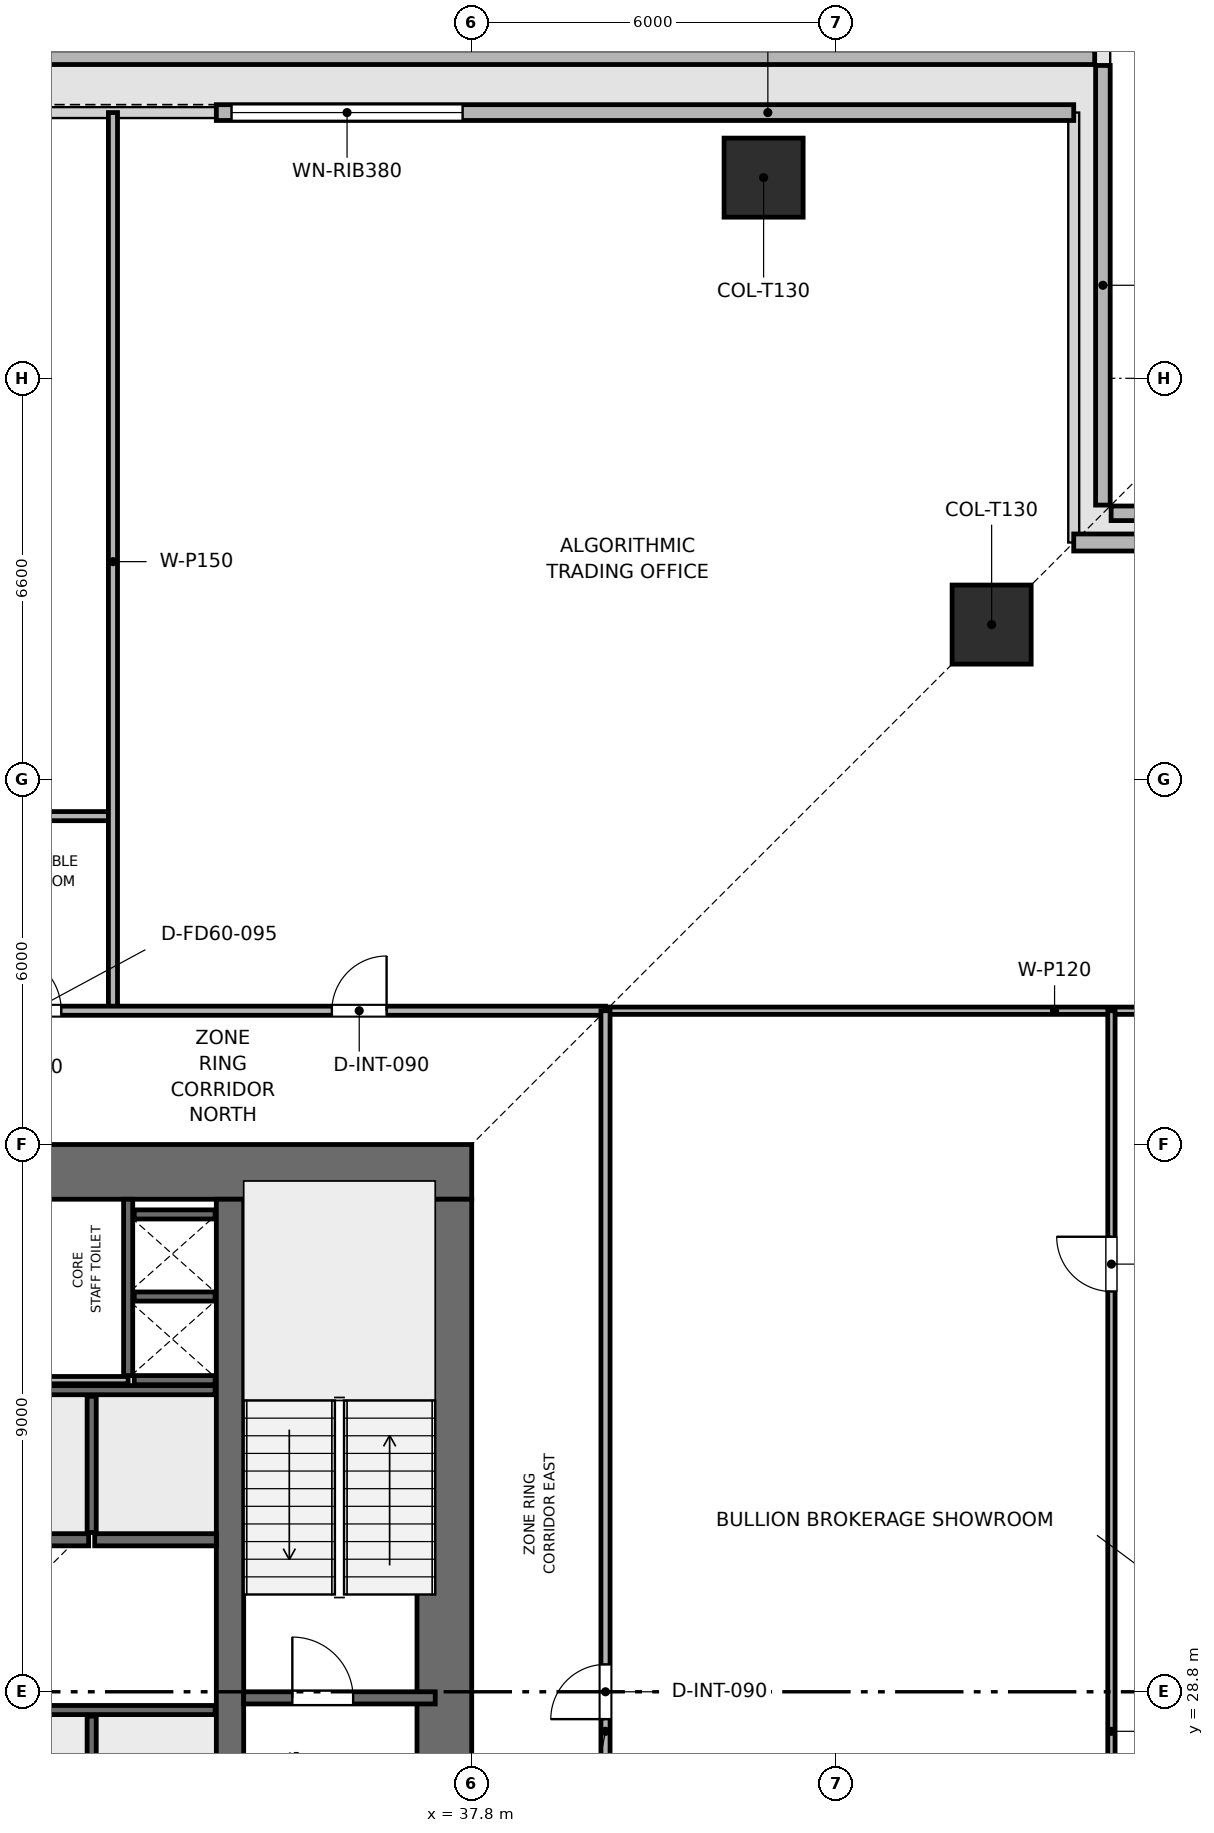
"""IFC4 building model, lengths in metres.
Left out: names, types, materials, properties, quantities, classifications, styles, units other than length and angle.
Written with IfcOpenShell. Run it as: python <this file> out.ifc"""

import sys

from ifc_helpers import new_model, si_unit, direction, frame, frame_2d, origin, origin_2d, place, context, subcontext, project, spatial, rectangle, extrude, element, fill, save


model = new_model("IFC4")
c1 = context("Model", 3, precision=1e-05, world=origin(), true_north=direction((0.0, 1.0)))
c2 = subcontext(c1, "Body", "Model", "MODEL_VIEW")
j1 = project(units=[si_unit("LENGTHUNIT", "METRE"), si_unit("PLANEANGLEUNIT", "RADIAN")], contexts=[c1])
p1 = place(None, origin())
s1 = spatial("IfcSite", under=j1, at=p1, CompositionType="ELEMENT")
p2 = place(p1, origin())
s2 = spatial("IfcBuilding", under=s1, at=p2, CompositionType="ELEMENT")
p3 = place(p2, frame((0.0, 0.0, 113.4)))
s3 = spatial("IfcBuildingStorey", under=s2, at=p3, CompositionType="ELEMENT", Elevation=113.4)
p4 = place(p3, frame((19.8, 37.35, 0.0), z_axis=(0.0, 0.0, 1.0), x_axis=(1.0, 0.0, 0.0)))
e1 = element("IfcWall", 1, at=p4, inside=s3, PredefinedType="SHEAR", context=c2, shape_type="SweptSolid", body=[
    extrude(rectangle(XDim=18.0, YDim=0.9, at=frame_2d((9.0, 0.0))), origin(), (0.0, 0.0, 1.0), 3.9),
])
p5 = place(p4, frame((7.05, 0.0, 0.0)))
e2 = element("IfcOpeningElement", 2, at=p5, cuts=e1, PredefinedType="OPENING", context=c2, shape_type="SweptSolid", body=[
    extrude(rectangle(XDim=1.1, YDim=2.15, at=frame_2d((0.55, 1.075))), frame((0.0, 0.46, 0.0), z_axis=(0.0, -1.0, 0.0), x_axis=(1.0, 0.0, 0.0)), (0.0, 0.0, 1.0), 0.92),
])
p6 = place(p3, frame((37.35, 20.7, 0.0), z_axis=(0.0, 0.0, 1.0), x_axis=(0.0, 1.0, 0.0)))
e3 = element("IfcWall", 3, at=p6, inside=s3, PredefinedType="SHEAR", context=c2, shape_type="SweptSolid", body=[
    extrude(rectangle(XDim=16.2, YDim=0.9, at=frame_2d((8.1, 0.0))), origin(), (0.0, 0.0, 1.0), 3.9),
])
p7 = place(p6, frame((4.6, 0.0, 0.0)))
e4 = element("IfcOpeningElement", 4, at=p7, cuts=e3, PredefinedType="OPENING", context=c2, shape_type="SweptSolid", body=[
    extrude(rectangle(XDim=1.1, YDim=2.15, at=frame_2d((0.55, 1.075))), frame((0.0, 0.46, 0.0), z_axis=(0.0, -1.0, 0.0), x_axis=(1.0, 0.0, 0.0)), (0.0, 0.0, 1.0), 0.92),
])
p8 = place(p3, frame((33.825, 20.7, 0.0), z_axis=(0.0, 0.0, 1.0), x_axis=(0.0, 1.0, 0.0)))
e5 = element("IfcWall", 5, at=p8, inside=s3, PredefinedType="SHEAR", context=c2, shape_type="SweptSolid", body=[
    extrude(rectangle(XDim=16.2, YDim=0.45, at=frame_2d((8.1, 0.0))), origin(), (0.0, 0.0, 1.0), 3.9),
])
for number, where, z_axis, x_axis in (
    (6, (42.6, 53.7, 0.003), (0.0, 0.0, 1.0), (1.0, 0.0, 0.0)),
    (7, (46.35, 46.35, 0.003), (0.0, 0.0, 1.0), (1.0, 0.0, 0.0)),
):
    element("IfcColumn", number, at=place(p3, frame(where, z_axis=z_axis, x_axis=x_axis)), inside=s3, PredefinedType="COLUMN", context=c2, shape_type="SweptSolid", body=[
        extrude(rectangle(XDim=1.3, YDim=1.3, at=origin_2d()), origin(), (0.0, 0.0, 1.0), 3.644),
    ])
for number, where, z_axis, x_axis in (
    (8, (55.545, 48.18, 0.0), (0.0, 0.0, 1.0), (-1.0, 0.0, 0.0)),
    (9, (48.18, 48.315, 0.0), (0.0, 0.0, 1.0), (0.0, 1.0, 0.0)),
):
    element("IfcWall", number, at=place(p3, frame(where, z_axis=z_axis, x_axis=x_axis)), inside=s3, PredefinedType="PARAPET", context=c2, shape_type="SweptSolid", body=[
        extrude(rectangle(XDim=7.23, YDim=0.24, at=frame_2d((3.615, 0.0))), origin(), (0.0, 0.0, 1.0), 1.2),
    ])
p9 = place(p3, frame((48.045, 55.68, 0.0), z_axis=(0.0, 0.0, 1.0), x_axis=(-1.0, 0.0, 0.0)))
e10 = element("IfcWall", 10, at=p9, inside=s3, PredefinedType="PARAPET", context=c2, shape_type="SweptSolid", body=[
    extrude(rectangle(XDim=38.49, YDim=0.24, at=frame_2d((19.245, 0.0))), origin(), (0.0, 0.0, 1.0), 1.2),
])
p10 = place(p3, frame((33.6, 54.77, 0.0), z_axis=(0.0, 0.0, 1.0), x_axis=(1.0, 0.0, 0.0)))
e11 = element("IfcWall", 11, at=p10, inside=s3, PredefinedType="SOLIDWALL", context=c2, shape_type="SweptSolid", body=[
    extrude(rectangle(XDim=14.1, YDim=0.26, at=frame_2d((7.05, 0.0))), origin(), (0.0, 0.0, 1.0), 3.65),
])
p11 = place(p10, frame((0.25, 0.0, 0.9)))
e12 = element("IfcOpeningElement", 12, at=p11, cuts=e11, PredefinedType="OPENING", context=c2, shape_type="SweptSolid", body=[
    extrude(rectangle(XDim=3.8, YDim=1.9, at=frame_2d((1.9, 0.95))), frame((0.0, 0.14, 0.0), z_axis=(0.0, -1.0, 0.0), x_axis=(1.0, 0.0, 0.0)), (0.0, 0.0, 1.0), 0.28),
])
p12 = place(p3, frame((47.7, 47.7, 0.0), z_axis=(0.0, 0.0, 1.0), x_axis=(1.0, 0.0, 0.0)))
e13 = element("IfcWall", 13, at=p12, inside=s3, PredefinedType="SOLIDWALL", context=c2, shape_type="SweptSolid", body=[
    extrude(rectangle(XDim=7.07, YDim=0.28, at=frame_2d((3.535, 0.0))), origin(), (0.0, 0.0, 1.0), 3.65),
])
p13 = place(p12, frame((2.285, 0.0, 0.9)))
e14 = element("IfcOpeningElement", 14, at=p13, cuts=e13, PredefinedType="OPENING", context=c2, shape_type="SweptSolid", body=[
    extrude(rectangle(XDim=2.5, YDim=1.9, at=frame_2d((1.25, 0.95))), frame((0.0, 0.15, 0.0), z_axis=(0.0, -1.0, 0.0), x_axis=(1.0, 0.0, 0.0)), (0.0, 0.0, 1.0), 0.3),
])
p14 = place(p3, frame((34.05, 28.7, 0.0), z_axis=(0.0, 0.0, 1.0), x_axis=(1.0, 0.0, 0.0)))
e15 = element("IfcWall", 15, at=p14, inside=s3, PredefinedType="SHEAR", context=c2, shape_type="SweptSolid", body=[
    extrude(rectangle(XDim=3.15, YDim=0.2, at=frame_2d((1.575, 0.0))), origin(), (0.0, 0.0, 1.0), 3.65),
])
p15 = place(p14, frame((0.8, 0.0, 0.0)))
e16 = element("IfcOpeningElement", 16, at=p15, cuts=e15, PredefinedType="OPENING", context=c2, shape_type="SweptSolid", body=[
    extrude(rectangle(XDim=1.0, YDim=2.1, at=frame_2d((0.5, 1.05))), frame((0.0, 0.11, 0.0), z_axis=(0.0, -1.0, 0.0), x_axis=(1.0, 0.0, 0.0)), (0.0, 0.0, 1.0), 0.22),
])
p16 = place(p3, frame((32.15, 34.0, 0.0), z_axis=(0.0, 0.0, 1.0), x_axis=(0.0, 1.0, 0.0)))
e17 = element("IfcWall", 17, at=p16, inside=s3, PredefinedType="SHEAR", context=c2, shape_type="SweptSolid", body=[
    extrude(rectangle(XDim=2.9, YDim=0.15, at=frame_2d((1.45, 0.0))), origin(), (0.0, 0.0, 1.0), 3.65),
])
for number, where, z_axis, x_axis in (
    (18, (32.25, 33.925, 0.0), (0.0, 0.0, 1.0), (1.0, 0.0, 0.0)),
    (19, (32.25, 35.3, 0.0), (0.0, 0.0, 1.0), (1.0, 0.0, 0.0)),
):
    element("IfcWall", number, at=place(p3, frame(where, z_axis=z_axis, x_axis=x_axis)), inside=s3, PredefinedType="SHEAR", context=c2, shape_type="SweptSolid", body=[
        extrude(rectangle(XDim=1.33, YDim=0.15, at=frame_2d((0.665, 0.0))), origin(), (0.0, 0.0, 1.0), 3.65),
    ])
for number, where, z_axis, x_axis in (
    (20, (29.5, 31.3, 0.0), (0.0, 0.0, 1.0), (1.0, 0.0, 0.0)),
    (21, (31.6, 31.3, 0.0), (0.0, 0.0, 1.0), (1.0, 0.0, 0.0)),
):
    element("IfcWall", number, at=place(p3, frame(where, z_axis=z_axis, x_axis=x_axis)), inside=s3, PredefinedType="SHEAR", context=c2, shape_type="SweptSolid", body=[
        extrude(rectangle(XDim=2.0, YDim=0.2, at=frame_2d((1.0, 0.0))), origin(), (0.0, 0.0, 1.0), 3.65),
    ])
p17 = place(p3, frame((32.25, 36.65, 0.0), z_axis=(0.0, 0.0, 1.0), x_axis=(1.0, 0.0, 0.0)))
e22 = element("IfcWall", 22, at=p17, inside=s3, PredefinedType="SHEAR", context=c2, shape_type="SweptSolid", body=[
    extrude(rectangle(XDim=1.33, YDim=0.15, at=frame_2d((0.665, 0.0))), origin(), (0.0, 0.0, 1.0), 3.65),
])
p18 = place(p3, frame((29.5, 28.5, 0.0), z_axis=(0.0, 0.0, 1.0), x_axis=(1.0, 0.0, 0.0)))
e23 = element("IfcWall", 23, at=p18, inside=s3, PredefinedType="SHEAR", context=c2, shape_type="SweptSolid", body=[
    extrude(rectangle(XDim=4.08, YDim=0.15, at=frame_2d((2.04, 0.0))), origin(), (0.0, 0.0, 1.0), 3.65),
])
p19 = place(p3, frame((31.55, 26.12, 0.0), z_axis=(0.0, 0.0, 1.0), x_axis=(0.0, 1.0, 0.0)))
e24 = element("IfcWall", 24, at=p19, inside=s3, PredefinedType="SHEAR", context=c2, shape_type="SweptSolid", body=[
    extrude(rectangle(XDim=2.28, YDim=0.15, at=frame_2d((1.14, 0.0))), origin(), (0.0, 0.0, 1.0), 3.65),
])
p20 = place(p3, frame((29.5, 33.76, 0.0), z_axis=(0.0, 0.0, 1.0), x_axis=(1.0, 0.0, 0.0)))
e25 = element("IfcWall", 25, at=p20, inside=s3, PredefinedType="SHEAR", context=c2, shape_type="SweptSolid", body=[
    extrude(rectangle(XDim=4.08, YDim=0.15, at=frame_2d((2.04, 0.0))), origin(), (0.0, 0.0, 1.0), 3.65),
])
p21 = place(p3, frame((31.55, 31.42, 0.0), z_axis=(0.0, 0.0, 1.0), x_axis=(0.0, 1.0, 0.0)))
e26 = element("IfcWall", 26, at=p21, inside=s3, PredefinedType="SHEAR", context=c2, shape_type="SweptSolid", body=[
    extrude(rectangle(XDim=2.24, YDim=0.15, at=frame_2d((1.12, 0.0))), origin(), (0.0, 0.0, 1.0), 3.65),
])
p22 = place(p3, frame((30.5, 33.925, 0.0), z_axis=(0.0, 0.0, 1.0), x_axis=(1.0, 0.0, 0.0)))
e27 = element("IfcWall", 27, at=p22, inside=s3, PredefinedType="PARTITIONING", context=c2, shape_type="SweptSolid", body=[
    extrude(rectangle(XDim=1.65, YDim=0.12, at=frame_2d((0.825, 0.0))), origin(), (0.0, 0.0, 1.0), 3.65),
])
p23 = place(p3, frame((23.5, 43.2, 0.0), z_axis=(0.0, 0.0, 1.0), x_axis=(1.0, 0.0, 0.0)))
e28 = element("IfcWall", 28, at=p23, inside=s3, PredefinedType="PARTITIONING", context=c2, shape_type="SweptSolid", body=[
    extrude(rectangle(XDim=8.4, YDim=0.15, at=frame_2d((4.2, 0.0))), origin(), (0.0, 0.0, 1.0), 3.185),
])
p24 = place(p3, frame((31.9, 40.0, 0.0), z_axis=(0.0, 0.0, 1.0), x_axis=(0.0, 1.0, 0.0)))
e29 = element("IfcWall", 29, at=p24, inside=s3, PredefinedType="PARTITIONING", context=c2, shape_type="SweptSolid", body=[
    extrude(rectangle(XDim=14.77, YDim=0.15, at=frame_2d((7.385, 0.0))), origin(), (0.0, 0.0, 1.0), 3.035),
])
p25 = place(p3, frame((40.0, 40.0, 0.0), z_axis=(0.0, 0.0, 1.0), x_axis=(1.0, 0.0, 0.0)))
e30 = element("IfcWall", 30, at=p25, inside=s3, PredefinedType="PARTITIONING", context=c2, shape_type="SweptSolid", body=[
    extrude(rectangle(XDim=14.77, YDim=0.12, at=frame_2d((7.385, 0.0))), origin(), (0.0, 0.0, 1.0), 3.035),
])
p26 = place(p3, frame((48.32, 17.6, 0.0), z_axis=(0.0, 0.0, 1.0), x_axis=(0.0, 1.0, 0.0)))
e31 = element("IfcWall", 31, at=p26, inside=s3, PredefinedType="PARTITIONING", context=c2, shape_type="SweptSolid", body=[
    extrude(rectangle(XDim=22.4, YDim=0.12, at=frame_2d((11.2, 0.0))), origin(), (0.0, 0.0, 1.0), 3.185),
])
p27 = place(p26, frame((17.783, 0.0, 0.0)))
e32 = element("IfcOpeningElement", 32, at=p27, cuts=e31, PredefinedType="OPENING", context=c2, shape_type="SweptSolid", body=[
    extrude(rectangle(XDim=0.9, YDim=2.1, at=frame_2d((0.45, 1.05))), frame((0.0, 0.07, 0.0), z_axis=(0.0, -1.0, 0.0), x_axis=(1.0, 0.0, 0.0)), (0.0, 0.0, 1.0), 0.14),
])
p28 = place(p3, frame((17.6, 40.0, 0.0), z_axis=(0.0, 0.0, 1.0), x_axis=(1.0, 0.0, 0.0)))
e33 = element("IfcWall", 33, at=p28, inside=s3, PredefinedType="PARTITIONING", context=c2, shape_type="SweptSolid", body=[
    extrude(rectangle(XDim=22.4, YDim=0.15, at=frame_2d((11.2, 0.0))), origin(), (0.0, 0.0, 1.0), 3.185),
])
p29 = place(p28, frame((2.5, 0.0, 0.0)))
e34 = element("IfcOpeningElement", 34, at=p29, cuts=e33, PredefinedType="OPENING", context=c2, shape_type="SweptSolid", body=[
    extrude(rectangle(XDim=0.9, YDim=2.1, at=frame_2d((0.45, 1.05))), frame((0.0, 0.085, 0.0), z_axis=(0.0, -1.0, 0.0), x_axis=(1.0, 0.0, 0.0)), (0.0, 0.0, 1.0), 0.17),
])
p30 = place(p28, frame((6.85, 0.0, 0.0)))
e35 = element("IfcOpeningElement", 35, at=p30, cuts=e33, PredefinedType="OPENING", context=c2, shape_type="SweptSolid", body=[
    extrude(rectangle(XDim=0.9, YDim=2.1, at=frame_2d((0.45, 1.05))), frame((0.0, 0.085, 0.0), z_axis=(0.0, -1.0, 0.0), x_axis=(1.0, 0.0, 0.0)), (0.0, 0.0, 1.0), 0.17),
])
p31 = place(p28, frame((9.75, 0.0, 0.0)))
e36 = element("IfcOpeningElement", 36, at=p31, cuts=e33, PredefinedType="OPENING", context=c2, shape_type="SweptSolid", body=[
    extrude(rectangle(XDim=0.9, YDim=2.1, at=frame_2d((0.45, 1.05))), frame((0.0, 0.085, 0.0), z_axis=(0.0, -1.0, 0.0), x_axis=(1.0, 0.0, 0.0)), (0.0, 0.0, 1.0), 0.17),
])
p32 = place(p28, frame((12.5, 0.0, 0.0)))
e37 = element("IfcOpeningElement", 37, at=p32, cuts=e33, PredefinedType="OPENING", context=c2, shape_type="SweptSolid", body=[
    extrude(rectangle(XDim=0.95, YDim=2.1, at=frame_2d((0.475, 1.05))), frame((0.0, 0.085, 0.0), z_axis=(0.0, -1.0, 0.0), x_axis=(1.0, 0.0, 0.0)), (0.0, 0.0, 1.0), 0.17),
])
p33 = place(p28, frame((17.9, 0.0, 0.0)))
e38 = element("IfcOpeningElement", 38, at=p33, cuts=e33, PredefinedType="OPENING", context=c2, shape_type="SweptSolid", body=[
    extrude(rectangle(XDim=0.9, YDim=2.1, at=frame_2d((0.45, 1.05))), frame((0.0, 0.085, 0.0), z_axis=(0.0, -1.0, 0.0), x_axis=(1.0, 0.0, 0.0)), (0.0, 0.0, 1.0), 0.17),
])
p34 = place(p3, frame((40.0, 17.6, 0.0), z_axis=(0.0, 0.0, 1.0), x_axis=(0.0, 1.0, 0.0)))
e39 = element("IfcWall", 39, at=p34, inside=s3, PredefinedType="PARTITIONING", context=c2, shape_type="SweptSolid", body=[
    extrude(rectangle(XDim=22.4, YDim=0.15, at=frame_2d((11.2, 0.0))), origin(), (0.0, 0.0, 1.0), 3.185),
])
p35 = place(p34, frame((10.75, 0.0, 0.0)))
e40 = element("IfcOpeningElement", 40, at=p35, cuts=e39, PredefinedType="OPENING", context=c2, shape_type="SweptSolid", body=[
    extrude(rectangle(XDim=0.9, YDim=2.1, at=frame_2d((0.45, 1.05))), frame((0.0, 0.085, 0.0), z_axis=(0.0, -1.0, 0.0), x_axis=(1.0, 0.0, 0.0)), (0.0, 0.0, 1.0), 0.17),
])
p36 = place(p11, origin())
e41 = element("IfcWindow", 41, at=p36, inside=s3, PartitioningType="SINGLE_PANEL", PredefinedType="WINDOW", context=c2, shape_type="SweptSolid", body=[
    extrude(rectangle(XDim=3.8, YDim=1.9, at=frame_2d((1.9, 0.95))), frame((0.0, 0.03, 0.0), z_axis=(0.0, -1.0, 0.0), x_axis=(1.0, 0.0, 0.0)), (0.0, 0.0, 1.0), 0.06),
])
fill(e12, e41)
p37 = place(p15, origin())
e42 = element("IfcDoor", 42, at=p37, inside=s3, OperationType="SINGLE_SWING_LEFT", PredefinedType="DOOR", context=c2, shape_type="SweptSolid", body=[
    extrude(rectangle(XDim=1.0, YDim=2.1, at=frame_2d((0.5, 1.05))), frame((0.0, 0.025, 0.0), z_axis=(0.0, -1.0, 0.0), x_axis=(1.0, 0.0, 0.0)), (0.0, 0.0, 1.0), 0.05),
])
fill(e16, e42)
p38 = place(p27, origin())
e43 = element("IfcDoor", 43, at=p38, inside=s3, OperationType="SINGLE_SWING_RIGHT", PredefinedType="DOOR", context=c2, shape_type="SweptSolid", body=[
    extrude(rectangle(XDim=0.9, YDim=2.1, at=frame_2d((0.45, 1.05))), frame((0.0, 0.025, 0.0), z_axis=(0.0, -1.0, 0.0), x_axis=(1.0, 0.0, 0.0)), (0.0, 0.0, 1.0), 0.05),
])
fill(e32, e43)
p39 = place(p32, origin())
e44 = element("IfcDoor", 44, at=p39, inside=s3, OperationType="SINGLE_SWING_LEFT", PredefinedType="DOOR", context=c2, shape_type="SweptSolid", body=[
    extrude(rectangle(XDim=0.95, YDim=2.1, at=frame_2d((0.475, 1.05))), frame((0.0, 0.025, 0.0), z_axis=(0.0, -1.0, 0.0), x_axis=(1.0, 0.0, 0.0)), (0.0, 0.0, 1.0), 0.05),
])
fill(e37, e44)
p40 = place(p33, origin())
e45 = element("IfcDoor", 45, at=p40, inside=s3, OperationType="SINGLE_SWING_RIGHT", PredefinedType="DOOR", context=c2, shape_type="SweptSolid", body=[
    extrude(rectangle(XDim=0.9, YDim=2.1, at=frame_2d((0.45, 1.05))), frame((0.0, 0.025, 0.0), z_axis=(0.0, -1.0, 0.0), x_axis=(1.0, 0.0, 0.0)), (0.0, 0.0, 1.0), 0.05),
])
fill(e38, e45)
p41 = place(p35, origin())
e46 = element("IfcDoor", 46, at=p41, inside=s3, OperationType="SINGLE_SWING_LEFT", PredefinedType="DOOR", context=c2, shape_type="SweptSolid", body=[
    extrude(rectangle(XDim=0.9, YDim=2.1, at=frame_2d((0.45, 1.05))), frame((0.0, 0.025, 0.0), z_axis=(0.0, -1.0, 0.0), x_axis=(1.0, 0.0, 0.0)), (0.0, 0.0, 1.0), 0.05),
])
fill(e40, e46)
save(model, sys.argv[1])
